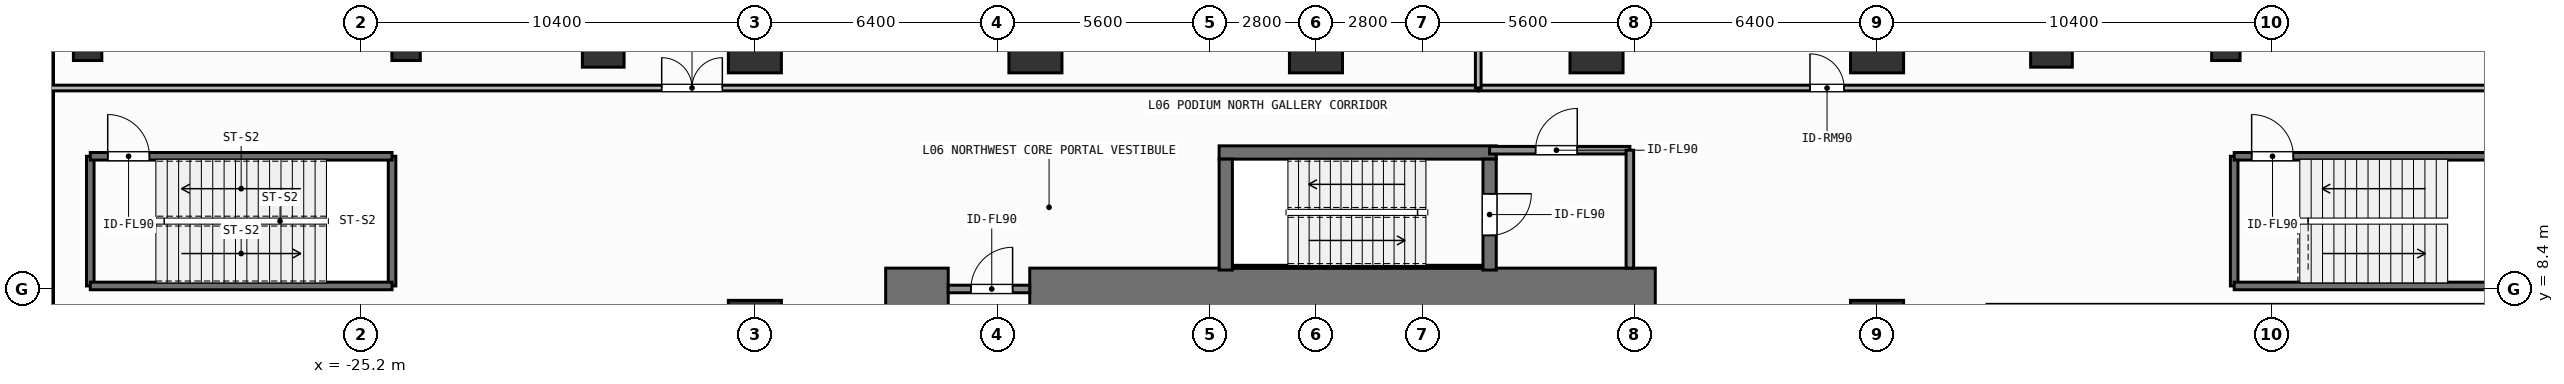
"""IFC4 building model, lengths in metres.
Left out: names, types, materials, properties, quantities, classifications, styles, units other than length and angle.
Written with IfcOpenShell. Run it as: python <this file> out.ifc"""

import sys

from ifc_helpers import new_model, si_unit, direction, frame, frame_2d, origin, origin_2d, place, context, subcontext, project, spatial, rectangle, extrude, element, fill, save


model = new_model("IFC4")
c1 = context("Model", 3, precision=1e-05, world=origin(), true_north=direction((0.0, 1.0)))
c2 = subcontext(c1, "Body", "Model", "MODEL_VIEW")
j1 = project(units=[si_unit("LENGTHUNIT", "METRE"), si_unit("PLANEANGLEUNIT", "RADIAN")], contexts=[c1])
p1 = place(None, origin())
s1 = spatial("IfcSite", under=j1, at=p1, CompositionType="ELEMENT")
p2 = place(p1, origin())
s2 = spatial("IfcBuilding", under=s1, at=p2, CompositionType="ELEMENT")
p3 = place(p2, frame((0.0, 0.0, 21.6)))
s3 = spatial("IfcBuildingStorey", under=s2, at=p3, CompositionType="ELEMENT", Elevation=21.6)
p4 = place(p3, frame((-11.35, 8.4, 0.0), z_axis=(0.0, 0.0, 1.0), x_axis=(1.0, 0.0, 0.0)))
e1 = element("IfcWall", 1, at=p4, inside=s3, PredefinedType="SHEAR", context=c2, shape_type="SweptSolid", body=[
    extrude(rectangle(XDim=1.65, YDim=1.1, at=frame_2d((0.825, 0.0))), origin(), (0.0, 0.0, 1.0), 4.8),
])
p5 = place(p3, frame((-7.55, 8.4, 0.0), z_axis=(0.0, 0.0, 1.0), x_axis=(1.0, 0.0, 0.0)))
e2 = element("IfcWall", 2, at=p5, inside=s3, PredefinedType="SHEAR", context=c2, shape_type="SweptSolid", body=[
    extrude(rectangle(XDim=16.5, YDim=1.1, at=frame_2d((8.25, 0.0))), origin(), (0.0, 0.0, 1.0), 4.8),
])
p6 = place(p3, frame((-2.555, 12.0, 0.0), z_axis=(0.0, 0.0, 1.0), x_axis=(1.0, 0.0, 0.0)))
e3 = element("IfcWall", 3, at=p6, inside=s3, PredefinedType="SHEAR", context=c2, shape_type="SweptSolid", body=[
    extrude(rectangle(XDim=7.31, YDim=0.35, at=frame_2d((3.655, 0.0))), origin(), (0.0, 0.0, 1.0), 4.8),
])
p7 = place(p3, frame((-2.2, 8.988, 0.0), z_axis=(0.0, 0.0, 1.0), x_axis=(1.0, 0.0, 0.0)))
e4 = element("IfcWall", 4, at=p7, inside=s3, PredefinedType="SHEAR", context=c2, shape_type="SweptSolid", body=[
    extrude(rectangle(XDim=6.6, YDim=0.075, at=frame_2d((3.3, 0.0))), origin(), (0.0, 0.0, 1.0), 4.8),
])
p8 = place(p3, frame((-2.38, 8.9, 0.0), z_axis=(0.0, 0.0, 1.0), x_axis=(0.0, 1.0, 0.0)))
e5 = element("IfcWall", 5, at=p8, inside=s3, PredefinedType="SHEAR", context=c2, shape_type="SweptSolid", body=[
    extrude(rectangle(XDim=2.925, YDim=0.35, at=frame_2d((1.462, 0.0))), origin(), (0.0, 0.0, 1.0), 4.8),
])
p9 = place(p3, frame((4.58, 11.825, 0.0), z_axis=(0.0, 0.0, 1.0), x_axis=(0.0, -1.0, 0.0)))
e6 = element("IfcWall", 6, at=p9, inside=s3, PredefinedType="SHEAR", context=c2, shape_type="SweptSolid", body=[
    extrude(rectangle(XDim=2.925, YDim=0.35, at=frame_2d((1.462, 0.0))), origin(), (0.0, 0.0, 1.0), 4.8),
])
p10 = place(p9, frame((0.913, 0.0, 0.0)))
e7 = element("IfcOpeningElement", 7, at=p10, cuts=e6, PredefinedType="OPENING", context=c2, shape_type="SweptSolid", body=[
    extrude(rectangle(XDim=1.1, YDim=2.15, at=frame_2d((0.55, 1.075))), frame((0.0, 0.185, 0.0), z_axis=(0.0, -1.0, 0.0), x_axis=(1.0, 0.0, 0.0)), (0.0, 0.0, 1.0), 0.37),
])
for number, where, z_axis, x_axis in (
    (8, (-14.8, 14.8, 0.0), (0.0, 0.0, 1.0), (1.0, 0.0, 0.0)),
    (9, (-7.4, 14.8, 0.0), (0.0, 0.0, 1.0), (1.0, 0.0, 0.0)),
    (10, (0.0, 14.8, 0.0), (0.0, 0.0, 1.0), (1.0, 0.0, 0.0)),
    (11, (7.4, 14.8, 0.0), (0.0, 0.0, 1.0), (1.0, 0.0, 0.0)),
    (12, (14.8, 14.8, 0.0), (0.0, 0.0, 1.0), (1.0, 0.0, 0.0)),
    (13, (-14.8, 7.4, 0.0), (0.0, 0.0, 1.0), (1.0, 0.0, 0.0)),
    (14, (14.8, 7.4, 0.0), (0.0, 0.0, 1.0), (1.0, 0.0, 0.0)),
):
    element("IfcColumn", number, at=place(p3, frame(where, z_axis=z_axis, x_axis=x_axis)), inside=s3, PredefinedType="COLUMN", context=c2, shape_type="SweptSolid", body=[
        extrude(rectangle(XDim=1.4, YDim=1.4, at=origin_2d()), origin(), (0.0, 0.0, 1.0), 4.8),
    ])
for number, where, z_axis, x_axis in (
    (15, (-18.8, 14.8, 0.0), (0.0, 0.0, 1.0), (1.0, 0.0, 0.0)),
    (16, (19.4, 14.8, 0.0), (0.0, 0.0, 1.0), (1.0, 0.0, 0.0)),
):
    element("IfcColumn", number, at=place(p3, frame(where, z_axis=z_axis, x_axis=x_axis)), inside=s3, PredefinedType="COLUMN", context=c2, shape_type="SweptSolid", body=[
        extrude(rectangle(XDim=1.1, YDim=1.1, at=origin_2d()), origin(), (0.0, 0.0, 1.0), 4.8),
    ])
for number, where, z_axis, x_axis in (
    (17, (-32.4, 14.8, 0.0), (0.0, 0.0, 1.0), (1.0, 0.0, 0.0)),
    (18, (-24.0, 14.8, 0.0), (0.0, 0.0, 1.0), (1.0, 0.0, 0.0)),
    (19, (24.0, 14.8, 0.0), (0.0, 0.0, 1.0), (1.0, 0.0, 0.0)),
):
    element("IfcColumn", number, at=place(p3, frame(where, z_axis=z_axis, x_axis=x_axis)), inside=s3, PredefinedType="COLUMN", context=c2, shape_type="SweptSolid", body=[
        extrude(rectangle(XDim=0.75, YDim=0.75, at=origin_2d()), origin(), (0.0, 0.0, 1.0), 4.8),
    ])
p11 = place(p3, frame((-33.45, 6.41, 0.0), z_axis=(0.0, 0.0, 1.0), x_axis=(0.0, 1.0, 0.0)))
e20 = element("IfcWall", 20, at=p11, inside=s3, PredefinedType="SOLIDWALL", context=c2, shape_type="SweptSolid", body=[
    extrude(rectangle(XDim=14.09, YDim=0.3, at=frame_2d((7.045, 0.0))), origin(), (0.0, 0.0, 1.0), 4.48),
])
for number, where, z_axis, x_axis in (
    (21, (-32.33, 8.48, 0.0), (0.0, 0.0, 1.0), (0.0, 1.0, 0.0)),
    (22, (-24.37, 11.9, 0.0), (0.0, 0.0, 1.0), (0.0, -1.0, 0.0)),
):
    element("IfcWall", number, at=place(p3, frame(where, z_axis=z_axis, x_axis=x_axis)), inside=s3, PredefinedType="SHEAR", context=c2, shape_type="SweptSolid", body=[
        extrude(rectangle(XDim=3.42, YDim=0.2, at=frame_2d((1.71, 0.0))), origin(), (0.0, 0.0, 1.0), 4.48),
    ])
p12 = place(p3, frame((-24.37, 8.48, 0.0), z_axis=(0.0, 0.0, 1.0), x_axis=(-1.0, 0.0, 0.0)))
e23 = element("IfcWall", 23, at=p12, inside=s3, PredefinedType="SHEAR", context=c2, shape_type="SweptSolid", body=[
    extrude(rectangle(XDim=7.96, YDim=0.2, at=frame_2d((3.98, 0.0))), origin(), (0.0, 0.0, 1.0), 4.48),
])
p13 = place(p3, frame((-32.33, 11.9, 0.0), z_axis=(0.0, 0.0, 1.0), x_axis=(1.0, 0.0, 0.0)))
e24 = element("IfcWall", 24, at=p13, inside=s3, PredefinedType="SHEAR", context=c2, shape_type="SweptSolid", body=[
    extrude(rectangle(XDim=7.96, YDim=0.2, at=frame_2d((3.98, 0.0))), origin(), (0.0, 0.0, 1.0), 4.48),
])
p14 = place(p13, frame((0.46, 0.0, 0.0)))
e25 = element("IfcOpeningElement", 25, at=p14, cuts=e24, PredefinedType="OPENING", context=c2, shape_type="SweptSolid", body=[
    extrude(rectangle(XDim=1.1, YDim=2.15, at=frame_2d((0.55, 1.075))), frame((0.0, 0.11, 0.0), z_axis=(0.0, -1.0, 0.0), x_axis=(1.0, 0.0, 0.0)), (0.0, 0.0, 1.0), 0.22),
])
p15 = place(p3, frame((24.22, 8.48, 0.0), z_axis=(0.0, 0.0, 1.0), x_axis=(0.0, 1.0, 0.0)))
e26 = element("IfcWall", 26, at=p15, inside=s3, PredefinedType="SHEAR", context=c2, shape_type="SweptSolid", body=[
    extrude(rectangle(XDim=3.42, YDim=0.2, at=frame_2d((1.71, 0.0))), origin(), (0.0, 0.0, 1.0), 4.48),
])
p16 = place(p3, frame((32.18, 8.48, 0.0), z_axis=(0.0, 0.0, 1.0), x_axis=(-1.0, 0.0, 0.0)))
e27 = element("IfcWall", 27, at=p16, inside=s3, PredefinedType="SHEAR", context=c2, shape_type="SweptSolid", body=[
    extrude(rectangle(XDim=7.96, YDim=0.2, at=frame_2d((3.98, 0.0))), origin(), (0.0, 0.0, 1.0), 4.48),
])
p17 = place(p3, frame((24.22, 11.9, 0.0), z_axis=(0.0, 0.0, 1.0), x_axis=(1.0, 0.0, 0.0)))
e28 = element("IfcWall", 28, at=p17, inside=s3, PredefinedType="SHEAR", context=c2, shape_type="SweptSolid", body=[
    extrude(rectangle(XDim=7.96, YDim=0.2, at=frame_2d((3.98, 0.0))), origin(), (0.0, 0.0, 1.0), 4.48),
])
p18 = place(p17, frame((0.46, 0.0, 0.0)))
e29 = element("IfcOpeningElement", 29, at=p18, cuts=e28, PredefinedType="OPENING", context=c2, shape_type="SweptSolid", body=[
    extrude(rectangle(XDim=1.1, YDim=2.15, at=frame_2d((0.55, 1.075))), frame((0.0, 0.11, 0.0), z_axis=(0.0, -1.0, 0.0), x_axis=(1.0, 0.0, 0.0)), (0.0, 0.0, 1.0), 0.22),
])
p19 = place(p3, frame((4.58, 12.06, 0.0), z_axis=(0.0, 0.0, 1.0), x_axis=(1.0, 0.0, 0.0)))
e30 = element("IfcWall", 30, at=p19, inside=s3, PredefinedType="SOLIDWALL", context=c2, shape_type="SweptSolid", body=[
    extrude(rectangle(XDim=3.7, YDim=0.2, at=frame_2d((1.85, 0.0))), origin(), (0.0, 0.0, 1.0), 4.48),
])
p20 = place(p19, frame((1.212, 0.0, 0.0)))
e31 = element("IfcOpeningElement", 31, at=p20, cuts=e30, PredefinedType="OPENING", context=c2, shape_type="SweptSolid", body=[
    extrude(rectangle(XDim=1.1, YDim=2.15, at=frame_2d((0.55, 1.075))), frame((0.0, 0.11, 0.0), z_axis=(0.0, -1.0, 0.0), x_axis=(1.0, 0.0, 0.0)), (0.0, 0.0, 1.0), 0.22),
])
p21 = place(p3, frame((-9.7, 8.4, 0.0), z_axis=(0.0, 0.0, 1.0), x_axis=(1.0, 0.0, 0.0)))
e32 = element("IfcWall", 32, at=p21, inside=s3, PredefinedType="SOLIDWALL", context=c2, shape_type="SweptSolid", body=[
    extrude(rectangle(XDim=2.15, YDim=0.2, at=frame_2d((1.075, 0.0))), origin(), (0.0, 0.0, 1.0), 3.52),
])
p22 = place(p21, frame((0.598, 0.0, 0.0)))
e33 = element("IfcOpeningElement", 33, at=p22, cuts=e32, PredefinedType="OPENING", context=c2, shape_type="SweptSolid", body=[
    extrude(rectangle(XDim=1.1, YDim=2.15, at=frame_2d((0.55, 1.075))), frame((0.0, 0.11, 0.0), z_axis=(0.0, -1.0, 0.0), x_axis=(1.0, 0.0, 0.0)), (0.0, 0.0, 1.0), 0.22),
])
p23 = place(p3, frame((-33.42, 13.7, 0.0), z_axis=(0.0, 0.0, 1.0), x_axis=(1.0, 0.0, 0.0)))
e34 = element("IfcWall", 34, at=p23, inside=s3, PredefinedType="PARTITIONING", context=c2, shape_type="SweptSolid", body=[
    extrude(rectangle(XDim=37.7, YDim=0.15, at=frame_2d((18.85, 0.0))), origin(), (0.0, 0.0, 1.0), 4.48),
])
p24 = place(p23, frame((16.162, 0.0, 0.0)))
e35 = element("IfcOpeningElement", 35, at=p24, cuts=e34, PredefinedType="OPENING", context=c2, shape_type="SweptSolid", body=[
    extrude(rectangle(XDim=1.6, YDim=2.3, at=frame_2d((0.8, 1.15))), frame((0.0, 0.085, 0.0), z_axis=(0.0, -1.0, 0.0), x_axis=(1.0, 0.0, 0.0)), (0.0, 0.0, 1.0), 0.17),
])
p25 = place(p3, frame((4.28, 13.7, 0.0), z_axis=(0.0, 0.0, 1.0), x_axis=(1.0, 0.0, 0.0)))
e36 = element("IfcWall", 36, at=p25, inside=s3, PredefinedType="PARTITIONING", context=c2, shape_type="SweptSolid", body=[
    extrude(rectangle(XDim=29.14, YDim=0.15, at=frame_2d((14.57, 0.0))), origin(), (0.0, 0.0, 1.0), 4.48),
])
p26 = place(p25, frame((8.751, 0.0, 0.0)))
e37 = element("IfcOpeningElement", 37, at=p26, cuts=e36, PredefinedType="OPENING", context=c2, shape_type="SweptSolid", body=[
    extrude(rectangle(XDim=0.9, YDim=2.1, at=frame_2d((0.45, 1.05))), frame((0.0, 0.085, 0.0), z_axis=(0.0, -1.0, 0.0), x_axis=(1.0, 0.0, 0.0)), (0.0, 0.0, 1.0), 0.17),
])
p27 = place(p3, frame((8.28, 8.95, 0.0), z_axis=(0.0, 0.0, 1.0), x_axis=(0.0, 1.0, 0.0)))
e38 = element("IfcWall", 38, at=p27, inside=s3, PredefinedType="SOLIDWALL", context=c2, shape_type="SweptSolid", body=[
    extrude(rectangle(XDim=3.11, YDim=0.2, at=frame_2d((1.555, 0.0))), origin(), (0.0, 0.0, 1.0), 4.48),
])
p28 = place(p3, frame((4.28, 13.7, 0.0), z_axis=(0.0, 0.0, 1.0), x_axis=(0.0, 1.0, 0.0)))
e39 = element("IfcWall", 39, at=p28, inside=s3, PredefinedType="PARTITIONING", context=c2, shape_type="SweptSolid", body=[
    extrude(rectangle(XDim=11.22, YDim=0.15, at=frame_2d((5.61, 0.0))), origin(), (0.0, 0.0, 1.0), 4.48),
])
p29 = place(p3, frame((17.7, 7.92, 0.0), z_axis=(0.0, 0.0, 1.0), x_axis=(1.0, 0.0, 0.0)))
e40 = element("IfcWall", 40, at=p29, inside=s3, PredefinedType="PARTITIONING", context=c2, shape_type="SweptSolid", body=[
    extrude(rectangle(XDim=15.72, YDim=0.15, at=frame_2d((7.86, 0.0))), origin(), (0.0, 0.0, 1.0), 4.48),
])
p30 = place(p10, origin())
e41 = element("IfcDoor", 41, at=p30, inside=s3, OperationType="SINGLE_SWING_LEFT", PredefinedType="DOOR", context=c2, shape_type="SweptSolid", body=[
    extrude(rectangle(XDim=1.1, YDim=2.15, at=frame_2d((0.55, 1.075))), frame((0.0, 0.025, 0.0), z_axis=(0.0, -1.0, 0.0), x_axis=(1.0, 0.0, 0.0)), (0.0, 0.0, 1.0), 0.05),
])
fill(e7, e41)
p31 = place(p14, origin())
e42 = element("IfcDoor", 42, at=p31, inside=s3, OperationType="SINGLE_SWING_LEFT", PredefinedType="DOOR", context=c2, shape_type="SweptSolid", body=[
    extrude(rectangle(XDim=1.1, YDim=2.15, at=frame_2d((0.55, 1.075))), frame((0.0, 0.025, 0.0), z_axis=(0.0, -1.0, 0.0), x_axis=(1.0, 0.0, 0.0)), (0.0, 0.0, 1.0), 0.05),
])
fill(e25, e42)
p32 = place(p18, origin())
e43 = element("IfcDoor", 43, at=p32, inside=s3, OperationType="SINGLE_SWING_LEFT", PredefinedType="DOOR", context=c2, shape_type="SweptSolid", body=[
    extrude(rectangle(XDim=1.1, YDim=2.15, at=frame_2d((0.55, 1.075))), frame((0.0, 0.025, 0.0), z_axis=(0.0, -1.0, 0.0), x_axis=(1.0, 0.0, 0.0)), (0.0, 0.0, 1.0), 0.05),
])
fill(e29, e43)
p33 = place(p20, origin())
e44 = element("IfcDoor", 44, at=p33, inside=s3, OperationType="SINGLE_SWING_RIGHT", PredefinedType="DOOR", context=c2, shape_type="SweptSolid", body=[
    extrude(rectangle(XDim=1.1, YDim=2.15, at=frame_2d((0.55, 1.075))), frame((0.0, 0.025, 0.0), z_axis=(0.0, -1.0, 0.0), x_axis=(1.0, 0.0, 0.0)), (0.0, 0.0, 1.0), 0.05),
])
fill(e31, e44)
p34 = place(p22, origin())
e45 = element("IfcDoor", 45, at=p34, inside=s3, OperationType="SINGLE_SWING_RIGHT", PredefinedType="DOOR", context=c2, shape_type="SweptSolid", body=[
    extrude(rectangle(XDim=1.1, YDim=2.15, at=frame_2d((0.55, 1.075))), frame((0.0, 0.025, 0.0), z_axis=(0.0, -1.0, 0.0), x_axis=(1.0, 0.0, 0.0)), (0.0, 0.0, 1.0), 0.05),
])
fill(e33, e45)
p35 = place(p24, origin())
e46 = element("IfcDoor", 46, at=p35, inside=s3, OperationType="SINGLE_SWING_LEFT", PredefinedType="DOOR", context=c2, shape_type="SweptSolid", body=[
    extrude(rectangle(XDim=1.6, YDim=2.3, at=frame_2d((0.8, 1.15))), frame((0.0, 0.025, 0.0), z_axis=(0.0, -1.0, 0.0), x_axis=(1.0, 0.0, 0.0)), (0.0, 0.0, 1.0), 0.05),
])
fill(e35, e46)
p36 = place(p26, origin())
e47 = element("IfcDoor", 47, at=p36, inside=s3, OperationType="SINGLE_SWING_LEFT", PredefinedType="DOOR", context=c2, shape_type="SweptSolid", body=[
    extrude(rectangle(XDim=0.9, YDim=2.1, at=frame_2d((0.45, 1.05))), frame((0.0, 0.025, 0.0), z_axis=(0.0, -1.0, 0.0), x_axis=(1.0, 0.0, 0.0)), (0.0, 0.0, 1.0), 0.05),
])
fill(e37, e47)
save(model, sys.argv[1])
